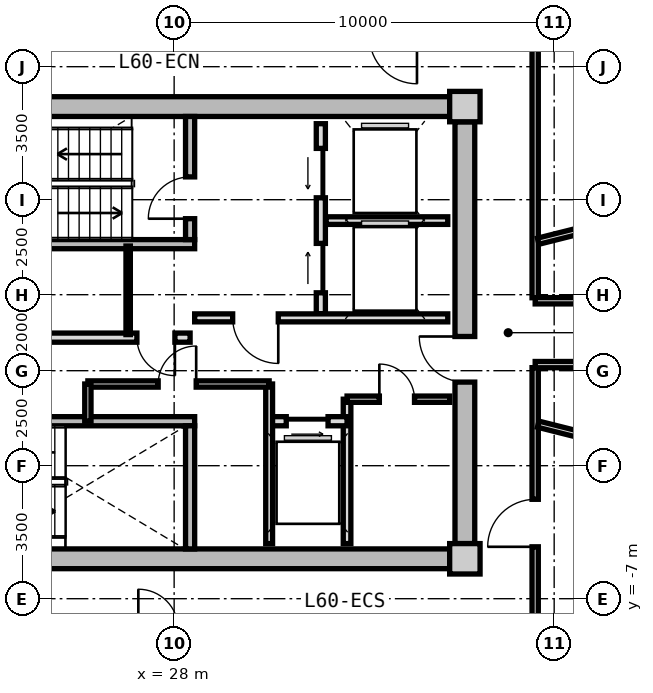
"""IFC4 building model, lengths in metres.
Left out: names, types, materials, properties, quantities, classifications, styles, units other than length and angle.
Written with IfcOpenShell. Run it as: python <this file> out.ifc"""

import sys

from ifc_helpers import new_model, si_unit, direction, frame, frame_2d, origin, origin_2d, place, context, subcontext, project, spatial, rectangle, extrude, source, transform, mapped, element, fill, save


model = new_model("IFC4")
c1 = context("Model", 3, precision=1e-05, world=origin(), true_north=direction((0.0, 1.0)))
c2 = subcontext(c1, "Body", "Model", "MODEL_VIEW")
j1 = project(units=[si_unit("LENGTHUNIT", "METRE"), si_unit("PLANEANGLEUNIT", "RADIAN")], contexts=[c1])
p1 = place(None, origin())
s1 = spatial("IfcSite", under=j1, at=p1, CompositionType="ELEMENT")
p2 = place(p1, origin())
s2 = spatial("IfcBuilding", under=s1, at=p2, CompositionType="ELEMENT")
p3 = place(p2, frame((0.0, 0.0, 193.7)))
s3 = spatial("IfcBuildingStorey", under=s2, at=p3, CompositionType="ELEMENT", Elevation=193.7)
m1 = source(origin(), c2, "Body", "SweptSolid", [
    extrude(rectangle(XDim=0.8, YDim=0.8, at=origin_2d()), origin(), (0.0, 0.0, 1.0), 3.05),
])
for number, where, z_axis, x_axis in (
    (1, (35.65, -5.95, 0.0), (0.0, 0.0, 1.0), (1.0, 0.0, 0.0)),
    (2, (35.65, 5.95, 0.0), (0.0, 0.0, 1.0), (1.0, 0.0, 0.0)),
):
    element("IfcColumn", number, at=place(p3, frame(where, z_axis=z_axis, x_axis=x_axis)), inside=s3, PredefinedType="COLUMN", context=c2, shape_type="MappedRepresentation", body=[
        mapped(m1, transform((0.0, 0.0, 0.0), x_axis=(1.0, 0.0, 0.0), y_axis=(0.0, 1.0, 0.0), z_axis=(0.0, 0.0, 1.0), scale=1.0)),
    ])
m2 = source(origin(), c2, "Body", "SweptSolid", [
    extrude(rectangle(XDim=14.5, YDim=0.52, at=frame_2d((7.25, 0.0))), origin(), (0.0, 0.0, 1.0), 2.81),
])
for number, where, z_axis, x_axis in (
    (3, (20.75, 5.95, 0.0), (0.0, 0.0, 1.0), (1.0, 0.0, 0.0)),
    (4, (35.25, -5.95, 0.0), (0.0, 0.0, 1.0), (-1.0, 0.0, 0.0)),
):
    element("IfcWall", number, at=place(p3, frame(where, z_axis=z_axis, x_axis=x_axis)), inside=s3, PredefinedType="SHEAR", context=c2, shape_type="MappedRepresentation", body=[
        mapped(m2, transform((0.0, 0.0, 0.0), x_axis=(1.0, 0.0, 0.0), y_axis=(0.0, 1.0, 0.0), z_axis=(0.0, 0.0, 1.0), scale=1.0)),
    ])
m3 = source(origin(), c2, "Body", "SweptSolid", [
    extrude(rectangle(XDim=11.1, YDim=0.52, at=frame_2d((5.55, 0.0))), origin(), (0.0, 0.0, 1.0), 2.81),
])
p4 = place(p3, frame((35.65, 5.55, 0.0), z_axis=(0.0, 0.0, 1.0), x_axis=(0.0, -1.0, 0.0)))
e5 = element("IfcWall", 5, at=p4, inside=s3, PredefinedType="SHEAR", context=c2, shape_type="MappedRepresentation", body=[
    mapped(m3, transform((0.0, 0.0, 0.0), x_axis=(1.0, 0.0, 0.0), y_axis=(0.0, 1.0, 0.0), z_axis=(0.0, 0.0, 1.0), scale=1.0)),
])
p5 = place(p4, frame((5.65, 0.0, 0.0)))
e6 = element("IfcOpeningElement", 6, at=p5, cuts=e5, PredefinedType="OPENING", context=c2, shape_type="SweptSolid", body=[
    extrude(rectangle(XDim=1.2, YDim=2.15, at=frame_2d((0.6, 1.075))), frame((0.0, 0.27, 0.0), z_axis=(0.0, -1.0, 0.0), x_axis=(1.0, 0.0, 0.0)), (0.0, 0.0, 1.0), 0.54),
])
m4 = source(origin(), c2, "Body", "SweptSolid", [
    extrude(rectangle(XDim=7.93, YDim=0.24, at=frame_2d((3.965, 0.0))), origin(), (0.0, 0.0, 1.0), 2.81),
])
p6 = place(p3, frame((20.61, 2.33, 0.0), z_axis=(0.0, 0.0, 1.0), x_axis=(1.0, 0.0, 0.0)))
e7 = element("IfcWall", 7, at=p6, inside=s3, PredefinedType="PARTITIONING", context=c2, shape_type="MappedRepresentation", body=[
    mapped(m4, transform((0.0, 0.0, 0.0), x_axis=(1.0, 0.0, 0.0), y_axis=(0.0, 1.0, 0.0), z_axis=(0.0, 0.0, 1.0), scale=1.0)),
])
m5 = source(origin(), c2, "Body", "SweptSolid", [
    extrude(rectangle(XDim=3.24, YDim=0.24, at=frame_2d((1.62, 0.0))), origin(), (0.0, 0.0, 1.0), 2.81),
])
p7 = place(p3, frame((28.42, 2.45, 0.0), z_axis=(0.0, 0.0, 1.0), x_axis=(0.0, 1.0, 0.0)))
e8 = element("IfcWall", 8, at=p7, inside=s3, PredefinedType="PARTITIONING", context=c2, shape_type="MappedRepresentation", body=[
    mapped(m5, transform((0.0, 0.0, 0.0), x_axis=(1.0, 0.0, 0.0), y_axis=(0.0, 1.0, 0.0), z_axis=(0.0, 0.0, 1.0), scale=1.0)),
])
p8 = place(p7, frame((0.55, 0.0, 0.0)))
e9 = element("IfcOpeningElement", 9, at=p8, cuts=e8, PredefinedType="OPENING", context=c2, shape_type="SweptSolid", body=[
    extrude(rectangle(XDim=1.1, YDim=2.15, at=frame_2d((0.55, 1.075))), frame((0.0, 0.13, 0.0), z_axis=(0.0, -1.0, 0.0), x_axis=(1.0, 0.0, 0.0)), (0.0, 0.0, 1.0), 0.26),
])
p9 = place(p3, frame((20.61, -2.33, 0.0), z_axis=(0.0, 0.0, 1.0), x_axis=(1.0, 0.0, 0.0)))
e10 = element("IfcWall", 10, at=p9, inside=s3, PredefinedType="PARTITIONING", context=c2, shape_type="MappedRepresentation", body=[
    mapped(m4, transform((0.0, 0.0, 0.0), x_axis=(1.0, 0.0, 0.0), y_axis=(0.0, 1.0, 0.0), z_axis=(0.0, 0.0, 1.0), scale=1.0)),
])
p10 = place(p9, frame((1.05, 0.0, 0.0)))
e11 = element("IfcOpeningElement", 11, at=p10, cuts=e10, PredefinedType="OPENING", context=c2, shape_type="SweptSolid", body=[
    extrude(rectangle(XDim=1.1, YDim=2.15, at=frame_2d((0.55, 1.075))), frame((0.0, 0.13, 0.0), z_axis=(0.0, -1.0, 0.0), x_axis=(1.0, 0.0, 0.0)), (0.0, 0.0, 1.0), 0.26),
])
p11 = place(p3, frame((28.42, -5.69, 0.0), z_axis=(0.0, 0.0, 1.0), x_axis=(0.0, 1.0, 0.0)))
e12 = element("IfcWall", 12, at=p11, inside=s3, PredefinedType="PARTITIONING", context=c2, shape_type="MappedRepresentation", body=[
    mapped(m5, transform((0.0, 0.0, 0.0), x_axis=(1.0, 0.0, 0.0), y_axis=(0.0, 1.0, 0.0), z_axis=(0.0, 0.0, 1.0), scale=1.0)),
])
m6 = source(origin(), c2, "Body", "SweptSolid", [
    extrude(rectangle(XDim=5.0, YDim=0.24, at=frame_2d((2.5, 0.0))), origin(), (0.0, 0.0, 1.0), 2.795),
])
p12 = place(p3, frame((31.86, 0.5, 0.0), z_axis=(0.0, 0.0, 1.0), x_axis=(0.0, 1.0, 0.0)))
e13 = element("IfcWall", 13, at=p12, inside=s3, PredefinedType="PARTITIONING", context=c2, shape_type="MappedRepresentation", body=[
    mapped(m6, transform((0.0, 0.0, 0.0), x_axis=(1.0, 0.0, 0.0), y_axis=(0.0, 1.0, 0.0), z_axis=(0.0, 0.0, 1.0), scale=1.0)),
])
p13 = place(p12, frame((3.05, 0.0, 0.0)))
e14 = element("IfcOpeningElement", 14, at=p13, cuts=e13, PredefinedType="OPENING", context=c2, shape_type="SweptSolid", body=[
    extrude(rectangle(XDim=1.3, YDim=2.2, at=frame_2d((0.65, 1.1))), frame((0.0, 0.13, 0.0), z_axis=(0.0, -1.0, 0.0), x_axis=(1.0, 0.0, 0.0)), (0.0, 0.0, 1.0), 0.26),
])
p14 = place(p12, frame((0.55, 0.0, 0.0)))
e15 = element("IfcOpeningElement", 15, at=p14, cuts=e13, PredefinedType="OPENING", context=c2, shape_type="SweptSolid", body=[
    extrude(rectangle(XDim=1.3, YDim=2.2, at=frame_2d((0.65, 1.1))), frame((0.0, 0.13, 0.0), z_axis=(0.0, -1.0, 0.0), x_axis=(1.0, 0.0, 0.0)), (0.0, 0.0, 1.0), 0.26),
])
m7 = source(origin(), c2, "Body", "SweptSolid", [
    extrude(rectangle(XDim=3.2, YDim=0.2, at=frame_2d((1.6, 0.0))), origin(), (0.0, 0.0, 1.0), 2.795),
])
p15 = place(p3, frame((32.0, 2.95, 0.0), z_axis=(0.0, 0.0, 1.0), x_axis=(1.0, 0.0, 0.0)))
e16 = element("IfcWall", 16, at=p15, inside=s3, PredefinedType="PARTITIONING", context=c2, shape_type="MappedRepresentation", body=[
    mapped(m7, transform((0.0, 0.0, 0.0), x_axis=(1.0, 0.0, 0.0), y_axis=(0.0, 1.0, 0.0), z_axis=(0.0, 0.0, 1.0), scale=1.0)),
])
m8 = source(origin(), c2, "Body", "SweptSolid", [
    extrude(rectangle(XDim=6.66, YDim=0.21, at=frame_2d((3.33, 0.0))), origin(), (0.0, 0.0, 1.0), 2.795),
])
p16 = place(p3, frame((28.54, 0.39, 0.0), z_axis=(0.0, 0.0, 1.0), x_axis=(1.0, 0.0, 0.0)))
e17 = element("IfcWall", 17, at=p16, inside=s3, PredefinedType="PARTITIONING", context=c2, shape_type="MappedRepresentation", body=[
    mapped(m8, transform((0.0, 0.0, 0.0), x_axis=(1.0, 0.0, 0.0), y_axis=(0.0, 1.0, 0.0), z_axis=(0.0, 0.0, 1.0), scale=1.0)),
])
p17 = place(p16, frame((1.0, 0.0, 0.0)))
e18 = element("IfcOpeningElement", 18, at=p17, cuts=e17, PredefinedType="OPENING", context=c2, shape_type="SweptSolid", body=[
    extrude(rectangle(XDim=1.2, YDim=2.15, at=frame_2d((0.6, 1.075))), frame((0.0, 0.115, 0.0), z_axis=(0.0, -1.0, 0.0), x_axis=(1.0, 0.0, 0.0)), (0.0, 0.0, 1.0), 0.23),
])
m9 = source(origin(), c2, "Body", "SweptSolid", [
    extrude(rectangle(XDim=7.62, YDim=0.24, at=frame_2d((3.81, 0.0))), origin(), (0.0, 0.0, 1.0), 2.795),
])
p18 = place(p3, frame((20.8, -0.13, 0.0), z_axis=(0.0, 0.0, 1.0), x_axis=(1.0, 0.0, 0.0)))
e19 = element("IfcWall", 19, at=p18, inside=s3, PredefinedType="PARTITIONING", context=c2, shape_type="MappedRepresentation", body=[
    mapped(m9, transform((0.0, 0.0, 0.0), x_axis=(1.0, 0.0, 0.0), y_axis=(0.0, 1.0, 0.0), z_axis=(0.0, 0.0, 1.0), scale=1.0)),
])
p19 = place(p18, frame((6.22, 0.0, 0.0)))
e20 = element("IfcOpeningElement", 20, at=p19, cuts=e19, PredefinedType="OPENING", context=c2, shape_type="SweptSolid", body=[
    extrude(rectangle(XDim=1.0, YDim=2.1, at=frame_2d((0.5, 1.05))), frame((0.0, 0.13, 0.0), z_axis=(0.0, -1.0, 0.0), x_axis=(1.0, 0.0, 0.0)), (0.0, 0.0, 1.0), 0.26),
])
p20 = place(p18, frame((2.4, 0.0, 0.0)))
e21 = element("IfcOpeningElement", 21, at=p20, cuts=e19, PredefinedType="OPENING", context=c2, shape_type="SweptSolid", body=[
    extrude(rectangle(XDim=1.0, YDim=2.1, at=frame_2d((0.5, 1.05))), frame((0.0, 0.13, 0.0), z_axis=(0.0, -1.0, 0.0), x_axis=(1.0, 0.0, 0.0)), (0.0, 0.0, 1.0), 0.26),
])
m10 = source(origin(), c2, "Body", "SweptSolid", [
    extrude(rectangle(XDim=2.33, YDim=0.115, at=frame_2d((1.165, 0.0))), origin(), (0.0, 0.0, 1.0), 2.795),
])
p21 = place(p3, frame((26.79, -0.05, 0.0), z_axis=(0.0, 0.0, 1.0), x_axis=(0.0, 1.0, 0.0)))
e22 = element("IfcWall", 22, at=p21, inside=s3, PredefinedType="PARTITIONING", context=c2, shape_type="MappedRepresentation", body=[
    mapped(m10, transform((0.0, 0.0, 0.0), x_axis=(1.0, 0.0, 0.0), y_axis=(0.0, 1.0, 0.0), z_axis=(0.0, 0.0, 1.0), scale=1.0)),
])
m11 = source(origin(), c2, "Body", "SweptSolid", [
    extrude(rectangle(XDim=3.8, YDim=0.2, at=frame_2d((1.9, 0.0))), origin(), (0.0, 0.0, 1.0), 2.795),
])
p22 = place(p3, frame((32.55, -5.55, 0.0), z_axis=(0.0, 0.0, 1.0), x_axis=(0.0, 1.0, 0.0)))
e23 = element("IfcWall", 23, at=p22, inside=s3, PredefinedType="PARTITIONING", context=c2, shape_type="MappedRepresentation", body=[
    mapped(m11, transform((0.0, 0.0, 0.0), x_axis=(1.0, 0.0, 0.0), y_axis=(0.0, 1.0, 0.0), z_axis=(0.0, 0.0, 1.0), scale=1.0)),
])
m12 = source(origin(), c2, "Body", "SweptSolid", [
    extrude(rectangle(XDim=2.05, YDim=0.24, at=frame_2d((1.025, 0.0))), origin(), (0.0, 0.0, 1.0), 2.795),
])
p23 = place(p3, frame((30.5, -2.33, 0.0), z_axis=(0.0, 0.0, 1.0), x_axis=(1.0, 0.0, 0.0)))
e24 = element("IfcWall", 24, at=p23, inside=s3, PredefinedType="PARTITIONING", context=c2, shape_type="MappedRepresentation", body=[
    mapped(m12, transform((0.0, 0.0, 0.0), x_axis=(1.0, 0.0, 0.0), y_axis=(0.0, 1.0, 0.0), z_axis=(0.0, 0.0, 1.0), scale=1.0)),
])
p24 = place(p23, frame((0.45, 0.0, 0.0)))
e25 = element("IfcOpeningElement", 25, at=p24, cuts=e24, PredefinedType="OPENING", context=c2, shape_type="SweptSolid", body=[
    extrude(rectangle(XDim=1.1, YDim=2.2, at=frame_2d((0.55, 1.1))), frame((0.0, 0.13, 0.0), z_axis=(0.0, -1.0, 0.0), x_axis=(1.0, 0.0, 0.0)), (0.0, 0.0, 1.0), 0.26),
])
m13 = source(origin(), c2, "Body", "SweptSolid", [
    extrude(rectangle(XDim=4.2, YDim=0.18, at=frame_2d((2.1, 0.0))), origin(), (0.0, 0.0, 1.0), 2.795),
])
p25 = place(p3, frame((30.5, -5.55, 0.0), z_axis=(0.0, 0.0, 1.0), x_axis=(0.0, 1.0, 0.0)))
e26 = element("IfcWall", 26, at=p25, inside=s3, PredefinedType="PARTITIONING", context=c2, shape_type="MappedRepresentation", body=[
    mapped(m13, transform((0.0, 0.0, 0.0), x_axis=(1.0, 0.0, 0.0), y_axis=(0.0, 1.0, 0.0), z_axis=(0.0, 0.0, 1.0), scale=1.0)),
])
m14 = source(origin(), c2, "Body", "SweptSolid", [
    extrude(rectangle(XDim=4.77, YDim=0.165, at=frame_2d((2.385, 0.0))), origin(), (0.0, 0.0, 1.0), 2.795),
])
p26 = place(p3, frame((25.73, -1.35, 0.0), z_axis=(0.0, 0.0, 1.0), x_axis=(1.0, 0.0, 0.0)))
e27 = element("IfcWall", 27, at=p26, inside=s3, PredefinedType="PARTITIONING", context=c2, shape_type="MappedRepresentation", body=[
    mapped(m14, transform((0.0, 0.0, 0.0), x_axis=(1.0, 0.0, 0.0), y_axis=(0.0, 1.0, 0.0), z_axis=(0.0, 0.0, 1.0), scale=1.0)),
])
p27 = place(p26, frame((1.85, 0.0, 0.0)))
e28 = element("IfcOpeningElement", 28, at=p27, cuts=e27, PredefinedType="OPENING", context=c2, shape_type="SweptSolid", body=[
    extrude(rectangle(XDim=1.0, YDim=2.1, at=frame_2d((0.5, 1.05))), frame((0.0, 0.093, 0.0), z_axis=(0.0, -1.0, 0.0), x_axis=(1.0, 0.0, 0.0)), (0.0, 0.0, 1.0), 0.185),
])
m15 = source(origin(), c2, "Body", "SweptSolid", [
    extrude(rectangle(XDim=0.98, YDim=0.165, at=frame_2d((0.49, 0.0))), origin(), (0.0, 0.0, 1.0), 2.795),
])
p28 = place(p3, frame((25.73, -2.33, 0.0), z_axis=(0.0, 0.0, 1.0), x_axis=(0.0, 1.0, 0.0)))
e29 = element("IfcWall", 29, at=p28, inside=s3, PredefinedType="PARTITIONING", context=c2, shape_type="MappedRepresentation", body=[
    mapped(m15, transform((0.0, 0.0, 0.0), x_axis=(1.0, 0.0, 0.0), y_axis=(0.0, 1.0, 0.0), z_axis=(0.0, 0.0, 1.0), scale=1.0)),
])
m16 = source(origin(), c2, "Body", "SweptSolid", [
    extrude(rectangle(XDim=2.7, YDim=0.165, at=frame_2d((1.35, 0.0))), origin(), (0.0, 0.0, 1.0), 2.795),
])
p29 = place(p3, frame((32.55, -1.75, 0.0), z_axis=(0.0, 0.0, 1.0), x_axis=(1.0, 0.0, 0.0)))
e30 = element("IfcWall", 30, at=p29, inside=s3, PredefinedType="PARTITIONING", context=c2, shape_type="MappedRepresentation", body=[
    mapped(m16, transform((0.0, 0.0, 0.0), x_axis=(1.0, 0.0, 0.0), y_axis=(0.0, 1.0, 0.0), z_axis=(0.0, 0.0, 1.0), scale=1.0)),
])
p30 = place(p29, frame((0.85, 0.0, 0.0)))
e31 = element("IfcOpeningElement", 31, at=p30, cuts=e30, PredefinedType="OPENING", context=c2, shape_type="SweptSolid", body=[
    extrude(rectangle(XDim=0.925, YDim=2.1, at=frame_2d((0.462, 1.05))), frame((0.0, 0.093, 0.0), z_axis=(0.0, -1.0, 0.0), x_axis=(1.0, 0.0, 0.0)), (0.0, 0.0, 1.0), 0.185),
])
m17 = source(origin(), c2, "Body", "SweptSolid", [
    extrude(rectangle(XDim=6.88, YDim=0.165, at=frame_2d((3.44, 0.0))), origin(), (0.0, 0.0, 1.0), 2.795),
])
p31 = place(p3, frame((37.5, 7.8, 0.0), z_axis=(0.0, 0.0, 1.0), x_axis=(0.0, -1.0, 0.0)))
e32 = element("IfcWall", 32, at=p31, inside=s3, PredefinedType="PARTITIONING", context=c2, shape_type="MappedRepresentation", body=[
    mapped(m17, transform((0.0, 0.0, 0.0), x_axis=(1.0, 0.0, 0.0), y_axis=(0.0, 1.0, 0.0), z_axis=(0.0, 0.0, 1.0), scale=1.0)),
])
p32 = place(p3, frame((37.5, -0.92, 0.0), z_axis=(0.0, 0.0, 1.0), x_axis=(0.0, -1.0, 0.0)))
e33 = element("IfcWall", 33, at=p32, inside=s3, PredefinedType="PARTITIONING", context=c2, shape_type="MappedRepresentation", body=[
    mapped(m17, transform((0.0, 0.0, 0.0), x_axis=(1.0, 0.0, 0.0), y_axis=(0.0, 1.0, 0.0), z_axis=(0.0, 0.0, 1.0), scale=1.0)),
])
p33 = place(p32, frame((3.464, 0.0, 0.0)))
e34 = element("IfcOpeningElement", 34, at=p33, cuts=e33, PredefinedType="OPENING", context=c2, shape_type="SweptSolid", body=[
    extrude(rectangle(XDim=1.25, YDim=2.2, at=frame_2d((0.625, 1.1))), frame((0.0, 0.093, 0.0), z_axis=(0.0, -1.0, 0.0), x_axis=(1.0, 0.0, 0.0)), (0.0, 0.0, 1.0), 0.185),
])
m18 = source(origin(), c2, "Body", "SweptSolid", [
    extrude(rectangle(XDim=6.157, YDim=0.165, at=frame_2d((3.079, 0.0))), origin(), (0.0, 0.0, 1.0), 2.395),
])
for number, where, z_axis, x_axis in (
    (35, (37.58, -2.407, 0.0), (0.0, 0.0, 1.0), (0.97, -0.244, 0.0)),
    (36, (37.58, 2.407, 0.0), (0.0, 0.0, 1.0), (0.97, 0.244, 0.0)),
):
    element("IfcWall", number, at=place(p3, frame(where, z_axis=z_axis, x_axis=x_axis)), inside=s3, PredefinedType="PARTITIONING", context=c2, shape_type="MappedRepresentation", body=[
        mapped(m18, transform((0.0, 0.0, 0.0), x_axis=(1.0, 0.0, 0.0), y_axis=(0.0, 1.0, 0.0), z_axis=(0.0, 0.0, 1.0), scale=1.0)),
    ])
m19 = source(origin(), c2, "Body", "SweptSolid", [
    extrude(rectangle(XDim=6.101, YDim=0.165, at=frame_2d((3.051, 0.0))), origin(), (0.0, 0.0, 1.0), 2.795),
])
p34 = place(p3, frame((37.5, 0.84, 0.0), z_axis=(0.0, 0.0, 1.0), x_axis=(1.0, 0.0, 0.0)))
e37 = element("IfcWall", 37, at=p34, inside=s3, PredefinedType="PARTITIONING", context=c2, shape_type="MappedRepresentation", body=[
    mapped(m19, transform((0.0, 0.0, 0.0), x_axis=(1.0, 0.0, 0.0), y_axis=(0.0, 1.0, 0.0), z_axis=(0.0, 0.0, 1.0), scale=1.0)),
])
p35 = place(p34, frame((2.576, 0.0, 0.0)))
e38 = element("IfcOpeningElement", 38, at=p35, cuts=e37, PredefinedType="OPENING", context=c2, shape_type="SweptSolid", body=[
    extrude(rectangle(XDim=0.95, YDim=2.1, at=frame_2d((0.475, 1.05))), frame((0.0, 0.093, 0.0), z_axis=(0.0, -1.0, 0.0), x_axis=(1.0, 0.0, 0.0)), (0.0, 0.0, 1.0), 0.185),
])
p36 = place(p3, frame((43.601, -0.84, 0.0), z_axis=(0.0, 0.0, 1.0), x_axis=(-1.0, 0.0, 0.0)))
e39 = element("IfcWall", 39, at=p36, inside=s3, PredefinedType="PARTITIONING", context=c2, shape_type="MappedRepresentation", body=[
    mapped(m19, transform((0.0, 0.0, 0.0), x_axis=(1.0, 0.0, 0.0), y_axis=(0.0, 1.0, 0.0), z_axis=(0.0, 0.0, 1.0), scale=1.0)),
])
p37 = place(p36, frame((2.576, 0.0, 0.0)))
e40 = element("IfcOpeningElement", 40, at=p37, cuts=e39, PredefinedType="OPENING", context=c2, shape_type="SweptSolid", body=[
    extrude(rectangle(XDim=0.95, YDim=2.1, at=frame_2d((0.475, 1.05))), frame((0.0, 0.093, 0.0), z_axis=(0.0, -1.0, 0.0), x_axis=(1.0, 0.0, 0.0)), (0.0, 0.0, 1.0), 0.185),
])
m20 = source(origin(), c2, "Body", "SweptSolid", [
    extrude(rectangle(XDim=1.1, YDim=2.15, at=frame_2d((0.55, 1.075))), frame((0.0, 0.025, 0.0), z_axis=(0.0, -1.0, 0.0), x_axis=(1.0, 0.0, 0.0)), (0.0, 0.0, 1.0), 0.05),
])
p38 = place(p8, origin())
e41 = element("IfcDoor", 41, at=p38, inside=s3, OperationType="SINGLE_SWING_LEFT", PredefinedType="DOOR", context=c2, shape_type="MappedRepresentation", body=[
    mapped(m20, transform((0.0, 0.0, 0.0), x_axis=(1.0, 0.0, 0.0), y_axis=(0.0, 1.0, 0.0), z_axis=(0.0, 0.0, 1.0), scale=1.0)),
])
fill(e9, e41)
m21 = source(origin(), c2, "Body", "SweptSolid", [
    extrude(rectangle(XDim=1.3, YDim=2.2, at=frame_2d((0.65, 1.1))), frame((0.0, 0.025, 0.0), z_axis=(0.0, -1.0, 0.0), x_axis=(1.0, 0.0, 0.0)), (0.0, 0.0, 1.0), 0.05),
])
p39 = place(p13, origin())
e42 = element("IfcDoor", 42, at=p39, inside=s3, OperationType="SLIDING_TO_LEFT", PredefinedType="DOOR", context=c2, shape_type="MappedRepresentation", body=[
    mapped(m21, transform((0.0, 0.0, 0.0), x_axis=(1.0, 0.0, 0.0), y_axis=(0.0, 1.0, 0.0), z_axis=(0.0, 0.0, 1.0), scale=1.0)),
])
fill(e14, e42)
p40 = place(p14, origin())
e43 = element("IfcDoor", 43, at=p40, inside=s3, OperationType="SLIDING_TO_RIGHT", PredefinedType="DOOR", context=c2, shape_type="MappedRepresentation", body=[
    mapped(m21, transform((0.0, 0.0, 0.0), x_axis=(1.0, 0.0, 0.0), y_axis=(0.0, 1.0, 0.0), z_axis=(0.0, 0.0, 1.0), scale=1.0)),
])
fill(e15, e43)
m22 = source(origin(), c2, "Body", "SweptSolid", [
    extrude(rectangle(XDim=1.2, YDim=2.15, at=frame_2d((0.6, 1.075))), frame((0.0, 0.025, 0.0), z_axis=(0.0, -1.0, 0.0), x_axis=(1.0, 0.0, 0.0)), (0.0, 0.0, 1.0), 0.05),
])
p41 = place(p17, frame((1.2, 0.0, 0.0), z_axis=(0.0, 0.0, 1.0), x_axis=(-1.0, 0.0, 0.0)))
e44 = element("IfcDoor", 44, at=p41, inside=s3, OperationType="SINGLE_SWING_LEFT", PredefinedType="DOOR", context=c2, shape_type="MappedRepresentation", body=[
    mapped(m22, transform((0.0, 0.0, 0.0), x_axis=(1.0, 0.0, 0.0), y_axis=(0.0, 1.0, 0.0), z_axis=(0.0, 0.0, 1.0), scale=1.0)),
])
fill(e18, e44)
p42 = place(p5, frame((1.2, 0.0, 0.0), z_axis=(0.0, 0.0, 1.0), x_axis=(-1.0, 0.0, 0.0)))
e45 = element("IfcDoor", 45, at=p42, inside=s3, OperationType="SINGLE_SWING_RIGHT", PredefinedType="DOOR", context=c2, shape_type="MappedRepresentation", body=[
    mapped(m22, transform((0.0, 0.0, 0.0), x_axis=(1.0, 0.0, 0.0), y_axis=(0.0, 1.0, 0.0), z_axis=(0.0, 0.0, 1.0), scale=1.0)),
])
fill(e6, e45)
m23 = source(origin(), c2, "Body", "SweptSolid", [
    extrude(rectangle(XDim=1.0, YDim=2.1, at=frame_2d((0.5, 1.05))), frame((0.0, 0.025, 0.0), z_axis=(0.0, -1.0, 0.0), x_axis=(1.0, 0.0, 0.0)), (0.0, 0.0, 1.0), 0.05),
])
p43 = place(p19, frame((1.0, 0.0, 0.0), z_axis=(0.0, 0.0, 1.0), x_axis=(-1.0, 0.0, 0.0)))
e46 = element("IfcDoor", 46, at=p43, inside=s3, OperationType="SINGLE_SWING_LEFT", PredefinedType="DOOR", context=c2, shape_type="MappedRepresentation", body=[
    mapped(m23, transform((0.0, 0.0, 0.0), x_axis=(1.0, 0.0, 0.0), y_axis=(0.0, 1.0, 0.0), z_axis=(0.0, 0.0, 1.0), scale=1.0)),
])
fill(e20, e46)
m24 = source(origin(), c2, "Body", "SweptSolid", [
    extrude(rectangle(XDim=1.1, YDim=2.2, at=frame_2d((0.55, 1.1))), frame((0.0, 0.025, 0.0), z_axis=(0.0, -1.0, 0.0), x_axis=(1.0, 0.0, 0.0)), (0.0, 0.0, 1.0), 0.05),
])
p44 = place(p24, frame((1.1, 0.0, 0.0), z_axis=(0.0, 0.0, 1.0), x_axis=(-1.0, 0.0, 0.0)))
e47 = element("IfcDoor", 47, at=p44, inside=s3, OperationType="SLIDING_TO_RIGHT", PredefinedType="DOOR", context=c2, shape_type="MappedRepresentation", body=[
    mapped(m24, transform((0.0, 0.0, 0.0), x_axis=(1.0, 0.0, 0.0), y_axis=(0.0, 1.0, 0.0), z_axis=(0.0, 0.0, 1.0), scale=1.0)),
])
fill(e25, e47)
p45 = place(p27, origin())
e48 = element("IfcDoor", 48, at=p45, inside=s3, OperationType="SINGLE_SWING_RIGHT", PredefinedType="DOOR", context=c2, shape_type="MappedRepresentation", body=[
    mapped(m23, transform((0.0, 0.0, 0.0), x_axis=(1.0, 0.0, 0.0), y_axis=(0.0, 1.0, 0.0), z_axis=(0.0, 0.0, 1.0), scale=1.0)),
])
fill(e28, e48)
m25 = source(origin(), c2, "Body", "SweptSolid", [
    extrude(rectangle(XDim=0.925, YDim=2.1, at=frame_2d((0.462, 1.05))), frame((0.0, 0.025, 0.0), z_axis=(0.0, -1.0, 0.0), x_axis=(1.0, 0.0, 0.0)), (0.0, 0.0, 1.0), 0.05),
])
p46 = place(p30, origin())
e49 = element("IfcDoor", 49, at=p46, inside=s3, OperationType="SINGLE_SWING_LEFT", PredefinedType="DOOR", context=c2, shape_type="MappedRepresentation", body=[
    mapped(m25, transform((0.0, 0.0, 0.0), x_axis=(1.0, 0.0, 0.0), y_axis=(0.0, 1.0, 0.0), z_axis=(0.0, 0.0, 1.0), scale=1.0)),
])
fill(e31, e49)
m26 = source(origin(), c2, "Body", "SweptSolid", [
    extrude(rectangle(XDim=1.25, YDim=2.2, at=frame_2d((0.625, 1.1))), frame((0.0, 0.025, 0.0), z_axis=(0.0, -1.0, 0.0), x_axis=(1.0, 0.0, 0.0)), (0.0, 0.0, 1.0), 0.05),
])
p47 = place(p33, frame((1.25, 0.0, 0.0), z_axis=(0.0, 0.0, 1.0), x_axis=(-1.0, 0.0, 0.0)))
e50 = element("IfcDoor", 50, at=p47, inside=s3, OperationType="SINGLE_SWING_LEFT", PredefinedType="DOOR", context=c2, shape_type="MappedRepresentation", body=[
    mapped(m26, transform((0.0, 0.0, 0.0), x_axis=(1.0, 0.0, 0.0), y_axis=(0.0, 1.0, 0.0), z_axis=(0.0, 0.0, 1.0), scale=1.0)),
])
fill(e34, e50)
save(model, sys.argv[1])
